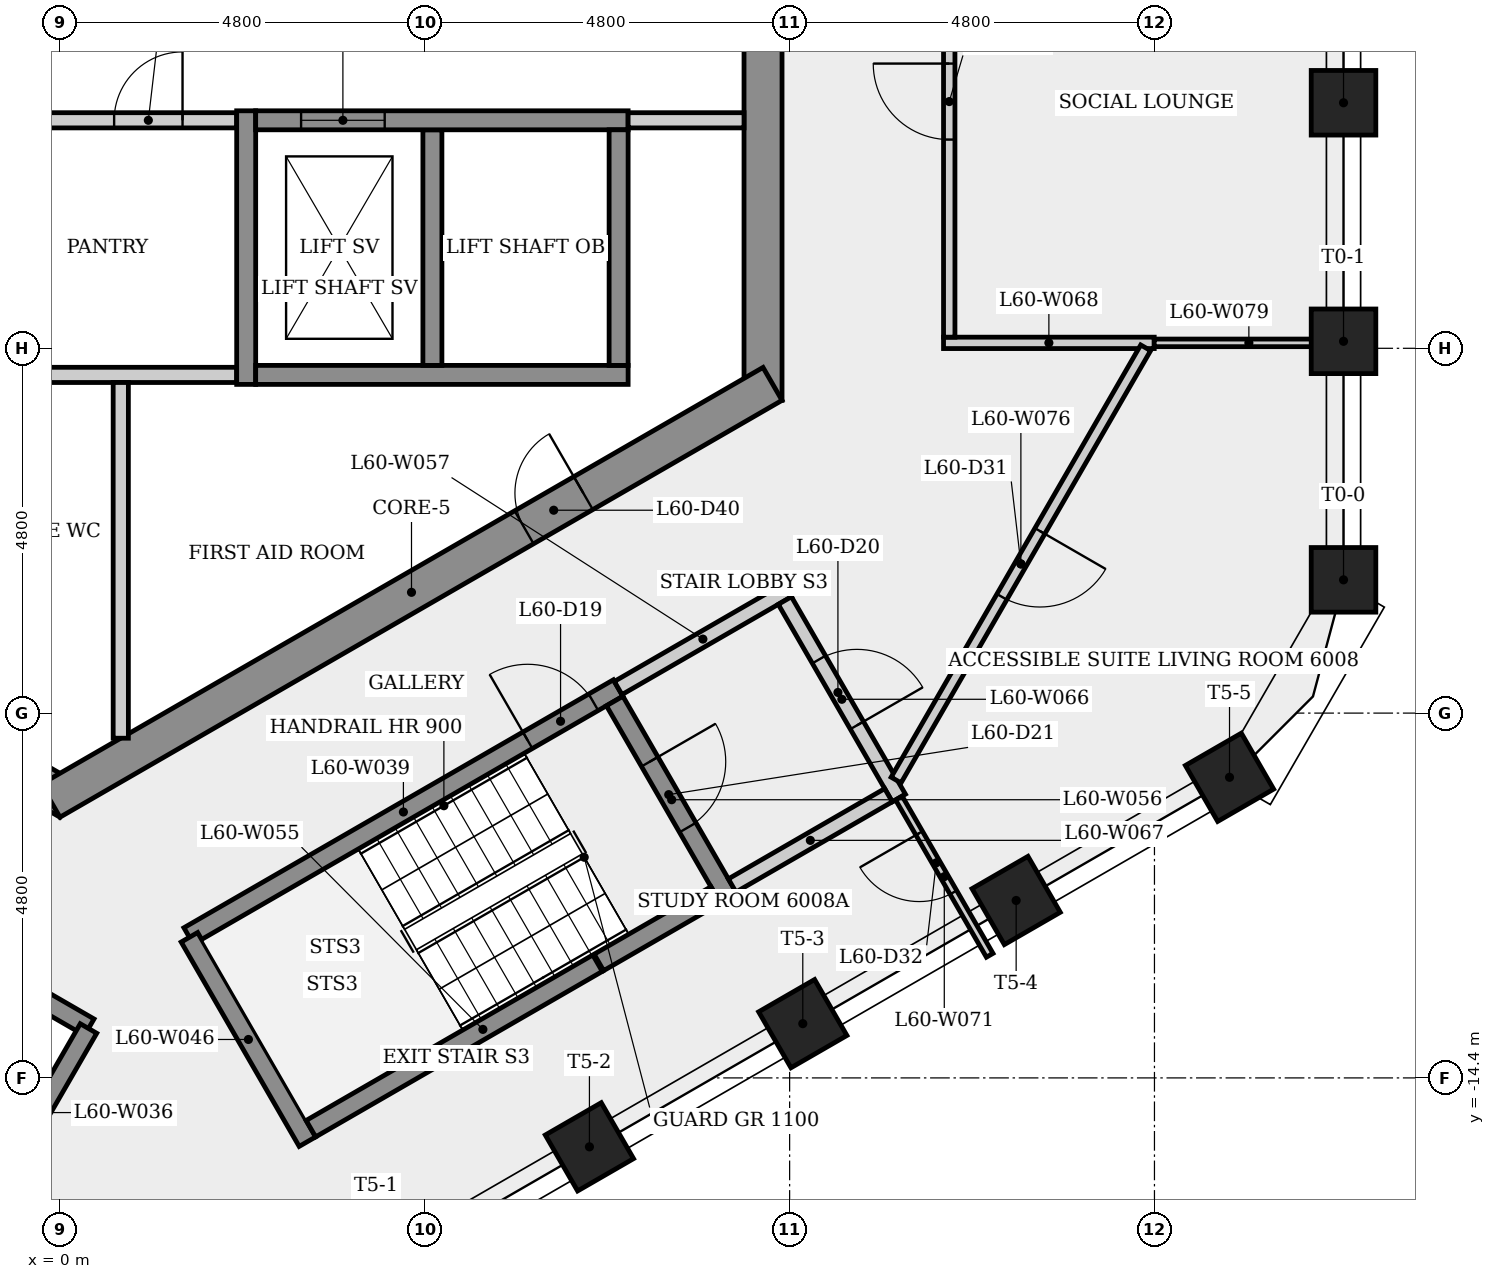
"""IFC4 building model, lengths in metres.
Left out: names, types, materials, properties, quantities, classifications, styles, units other than length and angle.
Written with IfcOpenShell. Run it as: python <this file> out.ifc"""

import sys

from ifc_helpers import new_model, si_unit, direction, frame, frame_2d, origin, origin_2d, place, context, subcontext, project, spatial, rectangle, extrude, element, fill, save


model = new_model("IFC4")
c1 = context("Model", 3, precision=1e-05, world=origin(), true_north=direction((0.0, 1.0)))
c2 = subcontext(c1, "Body", "Model", "MODEL_VIEW")
j1 = project(units=[si_unit("LENGTHUNIT", "METRE"), si_unit("PLANEANGLEUNIT", "RADIAN")], contexts=[c1])
p1 = place(None, origin())
s1 = spatial("IfcSite", under=j1, at=p1, CompositionType="ELEMENT")
p2 = place(p1, origin())
s2 = spatial("IfcBuilding", under=s1, at=p2, CompositionType="ELEMENT")
p3 = place(p2, frame((0.0, 0.0, 225.7)))
s3 = spatial("IfcBuildingStorey", under=s2, at=p3, CompositionType="ELEMENT", Elevation=225.7)
p4 = place(p3, frame((9.25, -5.485, 0.0), z_axis=(0.0, 0.0, 1.0), x_axis=(0.0, 1.0, 0.0)))
e1 = element("IfcWall", 1, at=p4, inside=s3, PredefinedType="SHEAR", context=c2, shape_type="SweptSolid", body=[
    extrude(rectangle(XDim=10.97, YDim=0.5, at=frame_2d((5.485, 0.0))), origin(), (0.0, 0.0, 1.0), 3.4),
])
p5 = place(p4, frame((4.685, 0.0, 0.0)))
e2 = element("IfcOpeningElement", 2, at=p5, cuts=e1, PredefinedType="OPENING", context=c2, shape_type="SweptSolid", body=[
    extrude(rectangle(XDim=1.6, YDim=2.1, at=frame_2d((0.8, 1.05))), frame((0.0, 0.26, 0.0), z_axis=(0.0, -1.0, 0.0), x_axis=(1.0, 0.0, 0.0)), (0.0, 0.0, 1.0), 0.52),
])
p6 = place(p3, frame((-9.375, -5.268, 0.0), z_axis=(0.0, 0.0, 1.0), x_axis=(0.866023993627, -0.500002442456, 0.0)))
e3 = element("IfcWall", 3, at=p6, inside=s3, PredefinedType="SHEAR", context=c2, shape_type="SweptSolid", body=[
    extrude(rectangle(XDim=10.97, YDim=0.5, at=frame_2d((5.485, 0.0))), origin(), (0.0, 0.0, 1.0), 3.4),
])
p7 = place(p6, frame((3.857, 0.0, 0.0)))
e4 = element("IfcOpeningElement", 4, at=p7, cuts=e3, PredefinedType="OPENING", context=c2, shape_type="SweptSolid", body=[
    extrude(rectangle(XDim=0.9, YDim=2.1, at=frame_2d((0.45, 1.05))), frame((0.0, 0.26, 0.0), z_axis=(0.0, -1.0, 0.0), x_axis=(1.0, 0.0, 0.0)), (0.0, 0.0, 1.0), 0.52),
])
p8 = place(p6, frame((9.076, 0.0, 0.0)))
e5 = element("IfcOpeningElement", 5, at=p8, cuts=e3, PredefinedType="OPENING", context=c2, shape_type="SweptSolid", body=[
    extrude(rectangle(XDim=0.9, YDim=2.1, at=frame_2d((0.45, 1.05))), frame((0.0, 0.26, 0.0), z_axis=(0.0, -1.0, 0.0), x_axis=(1.0, 0.0, 0.0)), (0.0, 0.0, 1.0), 0.52),
])
p9 = place(p3, frame((-0.125, -10.753, 0.0), z_axis=(0.0, 0.0, 1.0), x_axis=(0.866023993627, 0.500002442456, 0.0)))
e6 = element("IfcWall", 6, at=p9, inside=s3, PredefinedType="SHEAR", context=c2, shape_type="SweptSolid", body=[
    extrude(rectangle(XDim=10.97, YDim=0.5, at=frame_2d((5.485, 0.0))), origin(), (0.0, 0.0, 1.0), 3.4),
])
p10 = place(p9, frame((7.195, 0.0, 0.0)))
e7 = element("IfcOpeningElement", 7, at=p10, cuts=e6, PredefinedType="OPENING", context=c2, shape_type="SweptSolid", body=[
    extrude(rectangle(XDim=0.9, YDim=2.1, at=frame_2d((0.45, 1.05))), frame((0.0, 0.26, 0.0), z_axis=(0.0, -1.0, 0.0), x_axis=(1.0, 0.0, 0.0)), (0.0, 0.0, 1.0), 0.52),
])
for number, where, z_axis, x_axis in (
    (8, (16.887, -7.847, 0.0), (0.0, 0.0, 1.0), (1.0, 0.0, 0.0)),
    (9, (16.887, -4.708, 0.0), (0.0, 0.0, 1.0), (1.0, 0.0, 0.0)),
    (10, (16.887, -1.569, 0.0), (0.0, 0.0, 1.0), (1.0, 0.0, 0.0)),
    (11, (6.966, -15.307, 0.0), (0.0, 0.0, 1.0), (0.5, -0.866, 0.0)),
    (12, (9.773, -13.686, 0.0), (0.0, 0.0, 1.0), (0.5, -0.866, 0.0)),
    (13, (12.58, -12.065, 0.0), (0.0, 0.0, 1.0), (0.5, -0.866, 0.0)),
    (14, (15.387, -10.445, 0.0), (0.0, 0.0, 1.0), (0.5, -0.866, 0.0)),
):
    element("IfcColumn", number, at=place(p3, frame(where, z_axis=z_axis, x_axis=x_axis)), inside=s3, PredefinedType="COLUMN", context=c2, shape_type="SweptSolid", body=[
        extrude(rectangle(XDim=0.85, YDim=0.85, at=origin_2d()), origin(), (0.0, 0.0, 1.0), 3.4),
    ])
p11 = place(p3, frame((-9.0, -5.15, 0.0), z_axis=(0.0, 0.0, 1.0), x_axis=(1.0, 0.0, 0.0)))
e15 = element("IfcWall", 15, at=p11, inside=s3, PredefinedType="PARTITIONING", context=c2, shape_type="SweptSolid", body=[
    extrude(rectangle(XDim=11.325, YDim=0.2, at=frame_2d((5.663, 0.0))), origin(), (0.0, 0.0, 1.0), 3.05),
])
p12 = place(p3, frame((-9.0, -1.8, 0.0), z_axis=(0.0, 0.0, 1.0), x_axis=(1.0, 0.0, 0.0)))
e16 = element("IfcWall", 16, at=p12, inside=s3, PredefinedType="PARTITIONING", context=c2, shape_type="SweptSolid", body=[
    extrude(rectangle(XDim=11.325, YDim=0.2, at=frame_2d((5.663, 0.0))), origin(), (0.0, 0.0, 1.0), 3.05),
])
p13 = place(p12, frame((2.21, 0.0, 0.0)))
e17 = element("IfcOpeningElement", 17, at=p13, cuts=e16, PredefinedType="OPENING", context=c2, shape_type="SweptSolid", body=[
    extrude(rectangle(XDim=0.9, YDim=2.1, at=frame_2d((0.45, 1.05))), frame((0.0, 0.11, 0.0), z_axis=(0.0, -1.0, 0.0), x_axis=(1.0, 0.0, 0.0)), (0.0, 0.0, 1.0), 0.22),
])
p14 = place(p12, frame((6.71, 0.0, 0.0)))
e18 = element("IfcOpeningElement", 18, at=p14, cuts=e16, PredefinedType="OPENING", context=c2, shape_type="SweptSolid", body=[
    extrude(rectangle(XDim=0.9, YDim=2.1, at=frame_2d((0.45, 1.05))), frame((0.0, 0.11, 0.0), z_axis=(0.0, -1.0, 0.0), x_axis=(1.0, 0.0, 0.0)), (0.0, 0.0, 1.0), 0.22),
])
p15 = place(p12, frame((9.713, 0.0, 0.0)))
e19 = element("IfcOpeningElement", 19, at=p15, cuts=e16, PredefinedType="OPENING", context=c2, shape_type="SweptSolid", body=[
    extrude(rectangle(XDim=0.9, YDim=2.1, at=frame_2d((0.45, 1.05))), frame((0.0, 0.11, 0.0), z_axis=(0.0, -1.0, 0.0), x_axis=(1.0, 0.0, 0.0)), (0.0, 0.0, 1.0), 0.22),
])
p16 = place(p3, frame((-2.364, -12.145, 0.0), z_axis=(0.0, 0.0, 1.0), x_axis=(0.866048579423, -0.499959856469, 0.0)))
e20 = element("IfcWall", 20, at=p16, inside=s3, PredefinedType="SHEAR", context=c2, shape_type="SweptSolid", body=[
    extrude(rectangle(XDim=3.175, YDim=0.25, at=frame_2d((1.587, 0.0))), origin(), (0.0, 0.0, 1.0), 3.4),
])
p17 = place(p3, frame((0.375, -13.75, 0.0), z_axis=(0.0, 0.0, 1.0), x_axis=(-0.50003400563, -0.866005769735, 0.0)))
e21 = element("IfcWall", 21, at=p17, inside=s3, PredefinedType="SHEAR", context=c2, shape_type="SweptSolid", body=[
    extrude(rectangle(XDim=2.555, YDim=0.25, at=frame_2d((1.277, 0.0))), origin(), (0.0, 0.0, 1.0), 3.4),
])
p18 = place(p3, frame((0.8, -5.25, 0.0), z_axis=(0.0, 0.0, 1.0), x_axis=(0.0, -1.0, 0.0)))
e22 = element("IfcWall", 22, at=p18, inside=s3, PredefinedType="PARTITIONING", context=c2, shape_type="SweptSolid", body=[
    extrude(rectangle(XDim=4.68, YDim=0.2, at=frame_2d((2.34, 0.0))), origin(), (0.0, 0.0, 1.0), 3.05),
])
p19 = place(p3, frame((1.693, -12.532, 0.0), z_axis=(0.0, 0.0, 1.0), x_axis=(0.866031063448, 0.499990197047, 0.0)))
e23 = element("IfcWall", 23, at=p19, inside=s3, PredefinedType="SHEAR", context=c2, shape_type="SweptSolid", body=[
    extrude(rectangle(XDim=6.525, YDim=0.25, at=frame_2d((3.263, 0.0))), origin(), (0.0, 0.0, 1.0), 3.05),
])
p20 = place(p19, frame((5.15, 0.0, 0.0)))
e24 = element("IfcOpeningElement", 24, at=p20, cuts=e23, PredefinedType="OPENING", context=c2, shape_type="SweptSolid", body=[
    extrude(rectangle(XDim=1.0, YDim=2.1, at=frame_2d((0.5, 1.05))), frame((0.0, 0.135, 0.0), z_axis=(0.0, -1.0, 0.0), x_axis=(1.0, 0.0, 0.0)), (0.0, 0.0, 1.0), 0.27),
])
p21 = place(p3, frame((2.45, -5.275, 0.0), z_axis=(0.0, 0.0, 1.0), x_axis=(0.0, 1.0, 0.0)))
e25 = element("IfcWall", 25, at=p21, inside=s3, PredefinedType="SHEAR", context=c2, shape_type="SweptSolid", body=[
    extrude(rectangle(XDim=3.6, YDim=0.25, at=frame_2d((1.8, 0.0))), origin(), (0.0, 0.0, 1.0), 3.05),
])
p22 = place(p3, frame((3.256, -15.239, 0.0), z_axis=(0.0, 0.0, 1.0), x_axis=(-0.500003782172, 0.866023220135, 0.0)))
e26 = element("IfcWall", 26, at=p22, inside=s3, PredefinedType="SHEAR", context=c2, shape_type="SweptSolid", body=[
    extrude(rectangle(XDim=3.105, YDim=0.25, at=frame_2d((1.552, 0.0))), origin(), (0.0, 0.0, 1.0), 3.05),
])
p23 = place(p3, frame((2.575, -5.15, 0.0), z_axis=(0.0, 0.0, 1.0), x_axis=(1.0, 0.0, 0.0)))
e27 = element("IfcWall", 27, at=p23, inside=s3, PredefinedType="SHEAR", context=c2, shape_type="SweptSolid", body=[
    extrude(rectangle(XDim=4.9, YDim=0.25, at=frame_2d((2.45, 0.0))), origin(), (0.0, 0.0, 1.0), 3.05),
])
p24 = place(p3, frame((4.9, -1.925, 0.0), z_axis=(0.0, 0.0, 1.0), x_axis=(0.0, -1.0, 0.0)))
e28 = element("IfcWall", 28, at=p24, inside=s3, PredefinedType="SHEAR", context=c2, shape_type="SweptSolid", body=[
    extrude(rectangle(XDim=3.1, YDim=0.25, at=frame_2d((1.55, 0.0))), origin(), (0.0, 0.0, 1.0), 3.4),
])
p25 = place(p3, frame((2.575, -1.8, 0.0), z_axis=(0.0, 0.0, 1.0), x_axis=(1.0, 0.0, 0.0)))
e29 = element("IfcWall", 29, at=p25, inside=s3, PredefinedType="SHEAR", context=c2, shape_type="SweptSolid", body=[
    extrude(rectangle(XDim=4.9, YDim=0.25, at=frame_2d((2.45, 0.0))), origin(), (0.0, 0.0, 1.0), 3.05),
])
p26 = place(p25, frame((0.597, 0.0, 0.0)))
e30 = element("IfcOpeningElement", 30, at=p26, cuts=e29, PredefinedType="OPENING", context=c2, shape_type="SweptSolid", body=[
    extrude(rectangle(XDim=1.1, YDim=2.1, at=frame_2d((0.55, 1.05))), frame((0.0, 0.135, 0.0), z_axis=(0.0, -1.0, 0.0), x_axis=(1.0, 0.0, 0.0)), (0.0, 0.0, 1.0), 0.27),
])
p27 = place(p3, frame((7.073, -12.891, 0.0), z_axis=(0.0, 0.0, 1.0), x_axis=(-0.866023145199, -0.500003911965, 0.0)))
e31 = element("IfcWall", 31, at=p27, inside=s3, PredefinedType="SHEAR", context=c2, shape_type="SweptSolid", body=[
    extrude(rectangle(XDim=4.355, YDim=0.25, at=frame_2d((2.177, 0.0))), origin(), (0.0, 0.0, 1.0), 3.05),
])
p28 = place(p3, frame((7.298, -9.441, 0.0), z_axis=(0.0, 0.0, 1.0), x_axis=(0.50002537861, -0.866010750942, 0.0)))
e32 = element("IfcWall", 32, at=p28, inside=s3, PredefinedType="SHEAR", context=c2, shape_type="SweptSolid", body=[
    extrude(rectangle(XDim=3.0, YDim=0.25, at=frame_2d((1.5, 0.0))), origin(), (0.0, 0.0, 1.0), 3.05),
])
p29 = place(p28, frame((0.923, 0.0, 0.0)))
e33 = element("IfcOpeningElement", 33, at=p29, cuts=e32, PredefinedType="OPENING", context=c2, shape_type="SweptSolid", body=[
    extrude(rectangle(XDim=1.0, YDim=2.1, at=frame_2d((0.5, 1.05))), frame((0.0, 0.135, 0.0), z_axis=(0.0, -1.0, 0.0), x_axis=(1.0, 0.0, 0.0)), (0.0, 0.0, 1.0), 0.27),
])
p30 = place(p3, frame((7.344, -9.27, 0.0), z_axis=(0.0, 0.0, 1.0), x_axis=(0.866005588531, 0.500034319456, 0.0)))
e34 = element("IfcWall", 34, at=p30, inside=s3, PredefinedType="PARTITIONING", context=c2, shape_type="SweptSolid", body=[
    extrude(rectangle(XDim=2.575, YDim=0.2, at=frame_2d((1.288, 0.0))), origin(), (0.0, 0.0, 1.0), 3.05),
])
p31 = place(p3, frame((7.35, -1.925, 0.0), z_axis=(0.0, 0.0, 1.0), x_axis=(0.0, -1.0, 0.0)))
e35 = element("IfcWall", 35, at=p31, inside=s3, PredefinedType="SHEAR", context=c2, shape_type="SweptSolid", body=[
    extrude(rectangle(XDim=3.1, YDim=0.25, at=frame_2d((1.55, 0.0))), origin(), (0.0, 0.0, 1.0), 3.4),
])
p32 = place(p3, frame((8.627, -11.993, 0.0), z_axis=(0.0, 0.0, 1.0), x_axis=(-0.866059624469, -0.499940723351, 0.0)))
e36 = element("IfcWall", 36, at=p32, inside=s3, PredefinedType="SHEAR", context=c2, shape_type="SweptSolid", body=[
    extrude(rectangle(XDim=1.775, YDim=0.25, at=frame_2d((0.888, 0.0))), origin(), (0.0, 0.0, 1.0), 3.05),
])
p33 = place(p3, frame((9.0, -1.8, 0.0), z_axis=(0.0, 0.0, 1.0), x_axis=(-1.0, 0.0, 0.0)))
e37 = element("IfcWall", 37, at=p33, inside=s3, PredefinedType="PARTITIONING", context=c2, shape_type="SweptSolid", body=[
    extrude(rectangle(XDim=1.525, YDim=0.2, at=frame_2d((0.763, 0.0))), origin(), (0.0, 0.0, 1.0), 3.05),
])
p34 = place(p3, frame((9.537, -8.119, 0.0), z_axis=(0.0, 0.0, 1.0), x_axis=(0.499990139034, -0.866031096941, 0.0)))
e38 = element("IfcWall", 38, at=p34, inside=s3, PredefinedType="PARTITIONING", context=c2, shape_type="SweptSolid", body=[
    extrude(rectangle(XDim=3.0, YDim=0.2, at=frame_2d((1.5, 0.0))), origin(), (0.0, 0.0, 1.0), 3.05),
])
p35 = place(p34, frame((0.896, 0.0, 0.0)))
e39 = element("IfcOpeningElement", 39, at=p35, cuts=e38, PredefinedType="OPENING", context=c2, shape_type="SweptSolid", body=[
    extrude(rectangle(XDim=1.0, YDim=2.1, at=frame_2d((0.5, 1.05))), frame((0.0, 0.11, 0.0), z_axis=(0.0, -1.0, 0.0), x_axis=(1.0, 0.0, 0.0)), (0.0, 0.0, 1.0), 0.22),
])
p36 = place(p3, frame((10.901, -10.681, 0.0), z_axis=(0.0, 0.0, 1.0), x_axis=(-0.866007538022, -0.500030943131, 0.0)))
e40 = element("IfcWall", 40, at=p36, inside=s3, PredefinedType="PARTITIONING", context=c2, shape_type="SweptSolid", body=[
    extrude(rectangle(XDim=2.375, YDim=0.2, at=frame_2d((1.188, 0.0))), origin(), (0.0, 0.0, 1.0), 3.05),
])
p37 = place(p3, frame((11.625, -4.729, 0.0), z_axis=(0.0, 0.0, 1.0), x_axis=(1.0, 0.0, 0.0)))
e41 = element("IfcWall", 41, at=p37, inside=s3, PredefinedType="PARTITIONING", context=c2, shape_type="SweptSolid", body=[
    extrude(rectangle(XDim=2.772, YDim=0.15, at=frame_2d((1.386, 0.0))), origin(), (0.0, 0.0, 1.0), 3.05),
])
p38 = place(p3, frame((11.7, -4.654, 0.0), z_axis=(0.0, 0.0, 1.0), x_axis=(0.0, 1.0, 0.0)))
e42 = element("IfcWall", 42, at=p38, inside=s3, PredefinedType="PARTITIONING", context=c2, shape_type="SweptSolid", body=[
    extrude(rectangle(XDim=9.457, YDim=0.15, at=frame_2d((4.729, 0.0))), origin(), (0.0, 0.0, 1.0), 3.05),
])
p39 = place(p38, frame((2.6, 0.0, 0.0)))
e43 = element("IfcOpeningElement", 43, at=p39, cuts=e42, PredefinedType="OPENING", context=c2, shape_type="SweptSolid", body=[
    extrude(rectangle(XDim=1.0, YDim=2.1, at=frame_2d((0.5, 1.05))), frame((0.0, 0.085, 0.0), z_axis=(0.0, -1.0, 0.0), x_axis=(1.0, 0.0, 0.0)), (0.0, 0.0, 1.0), 0.17),
])
p40 = place(p38, frame((7.306, 0.0, 0.0)))
e44 = element("IfcOpeningElement", 44, at=p40, cuts=e42, PredefinedType="OPENING", context=c2, shape_type="SweptSolid", body=[
    extrude(rectangle(XDim=1.0, YDim=2.1, at=frame_2d((0.5, 1.05))), frame((0.0, 0.085, 0.0), z_axis=(0.0, -1.0, 0.0), x_axis=(1.0, 0.0, 0.0)), (0.0, 0.0, 1.0), 0.17),
])
p41 = place(p3, frame((12.232, -12.787, 0.0), z_axis=(0.0, 0.0, 1.0), x_axis=(-0.499940577336, 0.866059708757, 0.0)))
e45 = element("IfcWall", 45, at=p41, inside=s3, PredefinedType="PARTITIONING", context=c2, shape_type="SweptSolid", body=[
    extrude(rectangle(XDim=2.39, YDim=0.1, at=frame_2d((1.195, 0.0))), origin(), (0.0, 0.0, 1.0), 3.05),
])
p42 = place(p41, frame((0.956, 0.0, 0.0)))
e46 = element("IfcOpeningElement", 46, at=p42, cuts=e45, PredefinedType="OPENING", context=c2, shape_type="SweptSolid", body=[
    extrude(rectangle(XDim=0.9, YDim=2.1, at=frame_2d((0.45, 1.05))), frame((0.0, 0.06, 0.0), z_axis=(0.0, -1.0, 0.0), x_axis=(1.0, 0.0, 0.0)), (0.0, 0.0, 1.0), 0.12),
])
p43 = place(p3, frame((14.284, -4.793, 0.0), z_axis=(0.0, 0.0, 1.0), x_axis=(-0.500017439519, -0.866015334839, 0.0)))
e47 = element("IfcWall", 47, at=p43, inside=s3, PredefinedType="PARTITIONING", context=c2, shape_type="SweptSolid", body=[
    extrude(rectangle(XDim=6.567, YDim=0.15, at=frame_2d((3.284, 0.0))), origin(), (0.0, 0.0, 1.0), 3.05),
])
p44 = place(p43, frame((2.784, 0.0, 0.0)))
e48 = element("IfcOpeningElement", 48, at=p44, cuts=e47, PredefinedType="OPENING", context=c2, shape_type="SweptSolid", body=[
    extrude(rectangle(XDim=1.0, YDim=2.1, at=frame_2d((0.5, 1.05))), frame((0.0, 0.085, 0.0), z_axis=(0.0, -1.0, 0.0), x_axis=(1.0, 0.0, 0.0)), (0.0, 0.0, 1.0), 0.17),
])
p45 = place(p3, frame((16.887, -4.729, 0.0), z_axis=(0.0, 0.0, 1.0), x_axis=(-1.0, 0.0, 0.0)))
e49 = element("IfcWall", 49, at=p45, inside=s3, PredefinedType="PARTITIONING", context=c2, shape_type="SweptSolid", body=[
    extrude(rectangle(XDim=2.491, YDim=0.1, at=frame_2d((1.245, 0.0))), origin(), (0.0, 0.0, 1.0), 3.05),
])
p46 = place(p26, origin())
e50 = element("IfcDoor", 50, at=p46, inside=s3, OperationType="SLIDING_TO_LEFT", PredefinedType="DOOR", context=c2, shape_type="SweptSolid", body=[
    extrude(rectangle(XDim=1.1, YDim=2.1, at=frame_2d((0.55, 1.05))), frame((0.0, 0.025, 0.0), z_axis=(0.0, -1.0, 0.0), x_axis=(1.0, 0.0, 0.0)), (0.0, 0.0, 1.0), 0.05),
])
fill(e30, e50)
p47 = place(p15, origin())
e51 = element("IfcDoor", 51, at=p47, inside=s3, OperationType="SINGLE_SWING_RIGHT", PredefinedType="DOOR", context=c2, shape_type="SweptSolid", body=[
    extrude(rectangle(XDim=0.9, YDim=2.1, at=frame_2d((0.45, 1.05))), frame((0.0, 0.025, 0.0), z_axis=(0.0, -1.0, 0.0), x_axis=(1.0, 0.0, 0.0)), (0.0, 0.0, 1.0), 0.05),
])
fill(e19, e51)
p48 = place(p20, origin())
e52 = element("IfcDoor", 52, at=p48, inside=s3, OperationType="SINGLE_SWING_LEFT", PredefinedType="DOOR", context=c2, shape_type="SweptSolid", body=[
    extrude(rectangle(XDim=1.0, YDim=2.1, at=frame_2d((0.5, 1.05))), frame((0.0, 0.025, 0.0), z_axis=(0.0, -1.0, 0.0), x_axis=(1.0, 0.0, 0.0)), (0.0, 0.0, 1.0), 0.05),
])
fill(e24, e52)
p49 = place(p35, origin())
e53 = element("IfcDoor", 53, at=p49, inside=s3, OperationType="SINGLE_SWING_RIGHT", PredefinedType="DOOR", context=c2, shape_type="SweptSolid", body=[
    extrude(rectangle(XDim=1.0, YDim=2.1, at=frame_2d((0.5, 1.05))), frame((0.0, 0.025, 0.0), z_axis=(0.0, -1.0, 0.0), x_axis=(1.0, 0.0, 0.0)), (0.0, 0.0, 1.0), 0.05),
])
fill(e39, e53)
p50 = place(p29, origin())
e54 = element("IfcDoor", 54, at=p50, inside=s3, OperationType="SINGLE_SWING_LEFT", PredefinedType="DOOR", context=c2, shape_type="SweptSolid", body=[
    extrude(rectangle(XDim=1.0, YDim=2.1, at=frame_2d((0.5, 1.05))), frame((0.0, 0.025, 0.0), z_axis=(0.0, -1.0, 0.0), x_axis=(1.0, 0.0, 0.0)), (0.0, 0.0, 1.0), 0.05),
])
fill(e33, e54)
p51 = place(p39, origin())
e55 = element("IfcDoor", 55, at=p51, inside=s3, OperationType="SINGLE_SWING_RIGHT", PredefinedType="DOOR", context=c2, shape_type="SweptSolid", body=[
    extrude(rectangle(XDim=1.0, YDim=2.1, at=frame_2d((0.5, 1.05))), frame((0.0, 0.025, 0.0), z_axis=(0.0, -1.0, 0.0), x_axis=(1.0, 0.0, 0.0)), (0.0, 0.0, 1.0), 0.05),
])
fill(e43, e55)
p52 = place(p44, origin())
e56 = element("IfcDoor", 56, at=p52, inside=s3, OperationType="SINGLE_SWING_LEFT", PredefinedType="DOOR", context=c2, shape_type="SweptSolid", body=[
    extrude(rectangle(XDim=1.0, YDim=2.1, at=frame_2d((0.5, 1.05))), frame((0.0, 0.025, 0.0), z_axis=(0.0, -1.0, 0.0), x_axis=(1.0, 0.0, 0.0)), (0.0, 0.0, 1.0), 0.05),
])
fill(e48, e56)
p53 = place(p42, origin())
e57 = element("IfcDoor", 57, at=p53, inside=s3, OperationType="SINGLE_SWING_RIGHT", PredefinedType="DOOR", context=c2, shape_type="SweptSolid", body=[
    extrude(rectangle(XDim=0.9, YDim=2.1, at=frame_2d((0.45, 1.05))), frame((0.0, 0.025, 0.0), z_axis=(0.0, -1.0, 0.0), x_axis=(1.0, 0.0, 0.0)), (0.0, 0.0, 1.0), 0.05),
])
fill(e46, e57)
p54 = place(p10, origin())
e58 = element("IfcDoor", 58, at=p54, inside=s3, OperationType="SINGLE_SWING_RIGHT", PredefinedType="DOOR", context=c2, shape_type="SweptSolid", body=[
    extrude(rectangle(XDim=0.9, YDim=2.1, at=frame_2d((0.45, 1.05))), frame((0.0, 0.025, 0.0), z_axis=(0.0, -1.0, 0.0), x_axis=(1.0, 0.0, 0.0)), (0.0, 0.0, 1.0), 0.05),
])
fill(e7, e58)
save(model, sys.argv[1])
